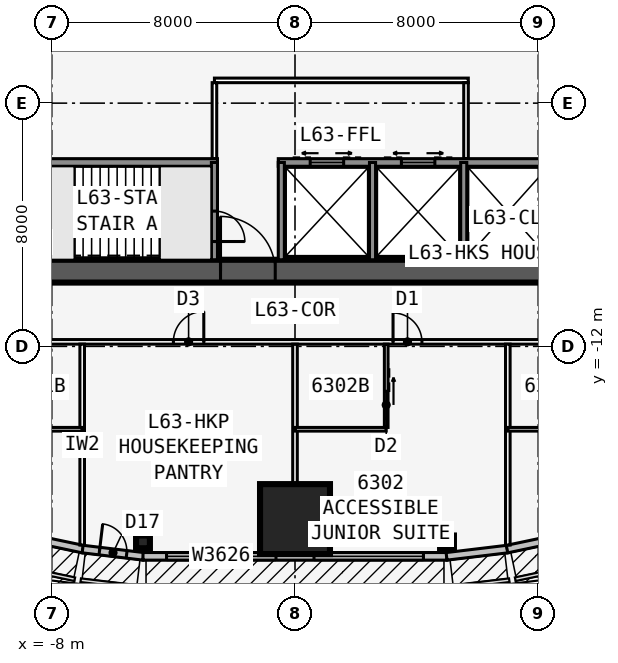
"""IFC4 building model, lengths in metres.
Left out: names, types, materials, properties, quantities, classifications, styles, units other than length and angle.
Written with IfcOpenShell. Run it as: python <this file> out.ifc"""

import sys

from ifc_helpers import new_model, si_unit, direction, frame, frame_2d, origin, origin_2d, place, context, subcontext, project, spatial, rectangle, i_section, extrude, element, fill, save


model = new_model("IFC4")
c1 = context("Model", 3, precision=1e-05, world=origin(), true_north=direction((0.0, 1.0)))
c2 = subcontext(c1, "Body", "Model", "MODEL_VIEW")
j1 = project(units=[si_unit("LENGTHUNIT", "METRE"), si_unit("PLANEANGLEUNIT", "RADIAN")], contexts=[c1])
p1 = place(None, origin())
s1 = spatial("IfcSite", under=j1, at=p1, CompositionType="ELEMENT")
p2 = place(p1, origin())
s2 = spatial("IfcBuilding", under=s1, at=p2, CompositionType="ELEMENT")
p3 = place(p2, frame((0.0, 0.0, 239.3)))
s3 = spatial("IfcBuildingStorey", under=s2, at=p3, CompositionType="ELEMENT", Elevation=239.3)
p4 = place(p3, frame((-16.5, -9.526, 0.0), z_axis=(0.0, 0.0, 1.0), x_axis=(1.0, 0.0, 0.0)))
e1 = element("IfcWall", 1, at=p4, inside=s3, PredefinedType="SHEAR", context=c2, shape_type="SweptSolid", body=[
    extrude(rectangle(XDim=33.0, YDim=0.75, at=frame_2d((16.5, 0.0))), origin(), (0.0, 0.0, 1.0), 3.6),
])
p5 = place(p4, frame((14.05, 0.0, 0.0)))
e2 = element("IfcOpeningElement", 2, at=p5, cuts=e1, PredefinedType="OPENING", context=c2, shape_type="SweptSolid", body=[
    extrude(rectangle(XDim=1.8, YDim=2.13, at=frame_2d((0.9, 1.065))), frame((0.0, 0.385, 0.0), z_axis=(0.0, -1.0, 0.0), x_axis=(1.0, 0.0, 0.0)), (0.0, 0.0, 1.0), 0.77),
])
p6 = place(p3, frame((-10.183, -5.951, 0.0), z_axis=(0.0, 0.0, 1.0), x_axis=(1.0, 0.0, 0.0)))
e3 = element("IfcWall", 3, at=p6, inside=s3, PredefinedType="SOLIDWALL", context=c2, shape_type="SweptSolid", body=[
    extrude(rectangle(XDim=7.633, YDim=0.25, at=frame_2d((3.816, 0.0))), origin(), (0.0, 0.0, 1.0), 3.435),
])
p7 = place(p3, frame((-0.55, -5.951, 0.0), z_axis=(0.0, 0.0, 1.0), x_axis=(1.0, 0.0, 0.0)))
e4 = element("IfcWall", 4, at=p7, inside=s3, PredefinedType="SOLIDWALL", context=c2, shape_type="SweptSolid", body=[
    extrude(rectangle(XDim=10.733, YDim=0.25, at=frame_2d((5.366, 0.0))), origin(), (0.0, 0.0, 1.0), 3.435),
])
p8 = place(p7, frame((9.314, 0.0, 0.0)))
e5 = element("IfcOpeningElement", 5, at=p8, cuts=e4, PredefinedType="OPENING", context=c2, shape_type="SweptSolid", body=[
    extrude(rectangle(XDim=0.9, YDim=2.13, at=frame_2d((0.45, 1.065))), frame((0.0, 0.135, 0.0), z_axis=(0.0, -1.0, 0.0), x_axis=(1.0, 0.0, 0.0)), (0.0, 0.0, 1.0), 0.27),
])
p9 = place(p7, frame((1.05, 0.0, 0.0)))
e6 = element("IfcOpeningElement", 6, at=p9, cuts=e4, PredefinedType="OPENING", context=c2, shape_type="SweptSolid", body=[
    extrude(rectangle(XDim=1.1, YDim=2.13, at=frame_2d((0.55, 1.065))), frame((0.0, 0.135, 0.0), z_axis=(0.0, -1.0, 0.0), x_axis=(1.0, 0.0, 0.0)), (0.0, 0.0, 1.0), 0.27),
])
p10 = place(p7, frame((4.05, 0.0, 0.0)))
e7 = element("IfcOpeningElement", 7, at=p10, cuts=e4, PredefinedType="OPENING", context=c2, shape_type="SweptSolid", body=[
    extrude(rectangle(XDim=1.1, YDim=2.13, at=frame_2d((0.55, 1.065))), frame((0.0, 0.135, 0.0), z_axis=(0.0, -1.0, 0.0), x_axis=(1.0, 0.0, 0.0)), (0.0, 0.0, 1.0), 0.27),
])
p11 = place(p3, frame((-2.65, -5.951, 0.0), z_axis=(0.0, 0.0, 1.0), x_axis=(0.0, -1.0, 0.0)))
e8 = element("IfcWall", 8, at=p11, inside=s3, PredefinedType="SOLIDWALL", context=c2, shape_type="SweptSolid", body=[
    extrude(rectangle(XDim=3.2, YDim=0.2, at=frame_2d((1.6, 0.0))), origin(), (0.0, 0.0, 1.0), 3.435),
])
p12 = place(p11, frame((1.6, 0.0, 0.0)))
e9 = element("IfcOpeningElement", 9, at=p12, cuts=e8, PredefinedType="OPENING", context=c2, shape_type="SweptSolid", body=[
    extrude(rectangle(XDim=1.0, YDim=2.13, at=frame_2d((0.5, 1.065))), frame((0.0, 0.11, 0.0), z_axis=(0.0, -1.0, 0.0), x_axis=(1.0, 0.0, 0.0)), (0.0, 0.0, 1.0), 0.22),
])
for number, where, z_axis, x_axis in (
    (10, (-0.45, -5.951, 0.0), (0.0, 0.0, 1.0), (0.0, -1.0, 0.0)),
    (11, (2.55, -5.951, 0.0), (0.0, 0.0, 1.0), (0.0, -1.0, 0.0)),
    (12, (5.55, -5.951, 0.0), (0.0, 0.0, 1.0), (0.0, -1.0, 0.0)),
):
    element("IfcWall", number, at=place(p3, frame(where, z_axis=z_axis, x_axis=x_axis)), inside=s3, PredefinedType="SOLIDWALL", context=c2, shape_type="SweptSolid", body=[
        extrude(rectangle(XDim=3.2, YDim=0.2, at=frame_2d((1.6, 0.0))), origin(), (0.0, 0.0, 1.0), 3.435),
    ])
p13 = place(p3, frame((16.5, -9.526, 0.0), z_axis=(0.0, 0.0, 1.0), x_axis=(-0.499999749417, 0.866025548458, 0.0)))
e13 = element("IfcWall", 13, at=p13, inside=s3, PredefinedType="SHEAR", context=c2, shape_type="SweptSolid", body=[
    extrude(rectangle(XDim=33.0, YDim=0.75, at=frame_2d((16.5, 0.0))), origin(), (0.0, 0.0, 1.0), 3.6),
])
p14 = place(p13, frame((14.15, 0.0, 0.0)))
e14 = element("IfcOpeningElement", 14, at=p14, cuts=e13, PredefinedType="OPENING", context=c2, shape_type="SweptSolid", body=[
    extrude(rectangle(XDim=1.8, YDim=2.13, at=frame_2d((0.9, 1.065))), frame((0.0, 0.385, 0.0), z_axis=(0.0, -1.0, 0.0), x_axis=(1.0, 0.0, 0.0)), (0.0, 0.0, 1.0), 0.77),
])
p15 = place(p13, frame((12.6, 0.0, 0.0)))
e15 = element("IfcOpeningElement", 15, at=p15, cuts=e13, PredefinedType="OPENING", context=c2, shape_type="SweptSolid", body=[
    extrude(rectangle(XDim=1.0, YDim=2.13, at=frame_2d((0.5, 1.065))), frame((0.0, 0.385, 0.0), z_axis=(0.0, -1.0, 0.0), x_axis=(1.0, 0.0, 0.0)), (0.0, 0.0, 1.0), 0.77),
])
p16 = place(p3, frame((10.245, -5.843, 0.0), z_axis=(0.0, 0.0, 1.0), x_axis=(-0.499993009313, 0.866029439822, 0.0)))
e16 = element("IfcWall", 16, at=p16, inside=s3, PredefinedType="SOLIDWALL", context=c2, shape_type="SweptSolid", body=[
    extrude(rectangle(XDim=7.733, YDim=0.25, at=frame_2d((3.866, 0.0))), origin(), (0.0, 0.0, 1.0), 3.435),
])
p17 = place(p3, frame((0.0, 19.052, 0.0), z_axis=(0.0, 0.0, 1.0), x_axis=(-0.499999749417, -0.866025548458, 0.0)))
e17 = element("IfcWall", 17, at=p17, inside=s3, PredefinedType="SHEAR", context=c2, shape_type="SweptSolid", body=[
    extrude(rectangle(XDim=33.0, YDim=0.75, at=frame_2d((16.5, 0.0))), origin(), (0.0, 0.0, 1.0), 3.6),
])
p18 = place(p17, frame((14.15, 0.0, 0.0)))
e18 = element("IfcOpeningElement", 18, at=p18, cuts=e17, PredefinedType="OPENING", context=c2, shape_type="SweptSolid", body=[
    extrude(rectangle(XDim=1.8, YDim=2.13, at=frame_2d((0.9, 1.065))), frame((0.0, 0.385, 0.0), z_axis=(0.0, -1.0, 0.0), x_axis=(1.0, 0.0, 0.0)), (0.0, 0.0, 1.0), 0.77),
])
p19 = place(p17, frame((12.6, 0.0, 0.0)))
e19 = element("IfcOpeningElement", 19, at=p19, cuts=e17, PredefinedType="OPENING", context=c2, shape_type="SweptSolid", body=[
    extrude(rectangle(XDim=1.0, YDim=2.13, at=frame_2d((0.5, 1.065))), frame((0.0, 0.385, 0.0), z_axis=(0.0, -1.0, 0.0), x_axis=(1.0, 0.0, 0.0)), (0.0, 0.0, 1.0), 0.77),
])
p20 = place(p3, frame((-4.929, 3.365, 0.0), z_axis=(0.0, 0.0, 1.0), x_axis=(-0.499991433582, -0.866030349552, 0.0)))
e20 = element("IfcWall", 20, at=p20, inside=s3, PredefinedType="SOLIDWALL", context=c2, shape_type="SweptSolid", body=[
    extrude(rectangle(XDim=10.633, YDim=0.25, at=frame_2d((5.316, 0.0))), origin(), (0.0, 0.0, 1.0), 3.435),
])
p21 = place(p20, frame((9.164, 0.0, 0.0)))
e21 = element("IfcOpeningElement", 21, at=p21, cuts=e20, PredefinedType="OPENING", context=c2, shape_type="SweptSolid", body=[
    extrude(rectangle(XDim=0.9, YDim=2.13, at=frame_2d((0.45, 1.065))), frame((0.0, 0.135, 0.0), z_axis=(0.0, -1.0, 0.0), x_axis=(1.0, 0.0, 0.0)), (0.0, 0.0, 1.0), 0.27),
])
p22 = place(p20, frame((1.1, 0.0, 0.0)))
e22 = element("IfcOpeningElement", 22, at=p22, cuts=e20, PredefinedType="OPENING", context=c2, shape_type="SweptSolid", body=[
    extrude(rectangle(XDim=0.9, YDim=2.13, at=frame_2d((0.45, 1.065))), frame((0.0, 0.135, 0.0), z_axis=(0.0, -1.0, 0.0), x_axis=(1.0, 0.0, 0.0)), (0.0, 0.0, 1.0), 0.27),
])
p23 = place(p20, frame((4.0, 0.0, 0.0)))
e23 = element("IfcOpeningElement", 23, at=p23, cuts=e20, PredefinedType="OPENING", context=c2, shape_type="SweptSolid", body=[
    extrude(rectangle(XDim=0.9, YDim=2.13, at=frame_2d((0.45, 1.065))), frame((0.0, 0.135, 0.0), z_axis=(0.0, -1.0, 0.0), x_axis=(1.0, 0.0, 0.0)), (0.0, 0.0, 1.0), 0.27),
])
for number, where, z_axis, x_axis in (
    (24, (-5.0, -18.43, 0.0), (0.0, 0.0, 1.0), (0.0, -1.0, 0.0)),
    (25, (5.0, -18.43, 0.0), (0.0, 0.0, 1.0), (0.0, -1.0, 0.0)),
):
    element("IfcColumn", number, at=place(p3, frame(where, z_axis=z_axis, x_axis=x_axis)), inside=s3, PredefinedType="COLUMN", context=c2, shape_type="SweptSolid", body=[
        extrude(i_section(OverallWidth=0.419, OverallDepth=0.455, WebThickness=0.042, FlangeThickness=0.068, at=origin_2d()), origin(), (0.0, 0.0, 1.0), 3.6),
    ])
p24 = place(p3, frame((0.0, -17.68, 0.0), z_axis=(0.0, 0.0, 1.0), x_axis=(0.0, -1.0, 0.0)))
e26 = element("IfcColumn", 26, at=p24, inside=s3, PredefinedType="COLUMN", context=c2, shape_type="SweptSolid", body=[
    extrude(rectangle(XDim=2.3, YDim=2.3, at=origin_2d()), origin(), (0.0, 0.0, 1.0), 3.6),
])
p25 = place(p3, frame((-13.974, -17.198, 0.0), z_axis=(0.0, 0.0, 1.0), x_axis=(0.978654320409, -0.205513311355, 0.0)))
e27 = element("IfcWall", 27, at=p25, inside=s3, PredefinedType="STANDARD", context=c2, shape_type="SweptSolid", body=[
    extrude(rectangle(XDim=7.153, YDim=0.25, at=frame_2d((3.576, 0.0))), origin(), (0.0, 0.0, 1.0), 3.435),
])
p26 = place(p25, frame((1.476, 0.0, 0.45)))
e28 = element("IfcOpeningElement", 28, at=p26, cuts=e27, PredefinedType="OPENING", context=c2, shape_type="SweptSolid", body=[
    extrude(rectangle(XDim=4.2, YDim=2.6, at=frame_2d((2.1, 1.3))), frame((0.0, 0.135, 0.0), z_axis=(0.0, -1.0, 0.0), x_axis=(1.0, 0.0, 0.0)), (0.0, 0.0, 1.0), 0.27),
])
p27 = place(p3, frame((-6.985, -18.667, 0.0), z_axis=(0.0, 0.0, 1.0), x_axis=(0.992877411981, -0.119140441403, 0.0)))
e29 = element("IfcWall", 29, at=p27, inside=s3, PredefinedType="STANDARD", context=c2, shape_type="SweptSolid", body=[
    extrude(rectangle(XDim=2.014, YDim=0.25, at=frame_2d((1.007, 0.0))), origin(), (0.0, 0.0, 1.0), 3.435),
])
p28 = place(p27, frame((0.557, 0.0, 0.0)))
e30 = element("IfcOpeningElement", 30, at=p28, cuts=e29, PredefinedType="OPENING", context=c2, shape_type="SweptSolid", body=[
    extrude(rectangle(XDim=0.9, YDim=2.13, at=frame_2d((0.45, 1.065))), frame((0.0, 0.135, 0.0), z_axis=(0.0, -1.0, 0.0), x_axis=(1.0, 0.0, 0.0)), (0.0, 0.0, 1.0), 0.27),
])
p29 = place(p3, frame((-5.0, -18.906, 0.0), z_axis=(0.0, 0.0, 1.0), x_axis=(1.0, 0.0, 0.0)))
e31 = element("IfcWall", 31, at=p29, inside=s3, PredefinedType="STANDARD", context=c2, shape_type="SweptSolid", body=[
    extrude(rectangle(XDim=10.0, YDim=0.25, at=frame_2d((5.0, 0.0))), origin(), (0.0, 0.0, 1.0), 3.435),
])
p30 = place(p29, frame((0.775, 0.0, 0.45)))
e32 = element("IfcOpeningElement", 32, at=p30, cuts=e31, PredefinedType="OPENING", context=c2, shape_type="SweptSolid", body=[
    extrude(rectangle(XDim=3.6, YDim=2.6, at=frame_2d((1.8, 1.3))), frame((0.0, 0.135, 0.0), z_axis=(0.0, -1.0, 0.0), x_axis=(1.0, 0.0, 0.0)), (0.0, 0.0, 1.0), 0.27),
])
p31 = place(p29, frame((5.625, 0.0, 0.45)))
e33 = element("IfcOpeningElement", 33, at=p31, cuts=e31, PredefinedType="OPENING", context=c2, shape_type="SweptSolid", body=[
    extrude(rectangle(XDim=3.6, YDim=2.6, at=frame_2d((1.8, 1.3))), frame((0.0, 0.135, 0.0), z_axis=(0.0, -1.0, 0.0), x_axis=(1.0, 0.0, 0.0)), (0.0, 0.0, 1.0), 0.27),
])
p32 = place(p3, frame((4.985, -18.906, 0.0), z_axis=(0.0, 0.0, 1.0), x_axis=(0.992877411981, 0.119140441403, 0.0)))
e34 = element("IfcWall", 34, at=p32, inside=s3, PredefinedType="STANDARD", context=c2, shape_type="SweptSolid", body=[
    extrude(rectangle(XDim=2.014, YDim=0.25, at=frame_2d((1.007, 0.0))), origin(), (0.0, 0.0, 1.0), 3.435),
])
p33 = place(p3, frame((6.974, -18.668, 0.0), z_axis=(0.0, 0.0, 1.0), x_axis=(0.978654320409, 0.205513311355, 0.0)))
e35 = element("IfcWall", 35, at=p33, inside=s3, PredefinedType="STANDARD", context=c2, shape_type="SweptSolid", body=[
    extrude(rectangle(XDim=7.153, YDim=0.25, at=frame_2d((3.576, 0.0))), origin(), (0.0, 0.0, 1.0), 3.435),
])
p34 = place(p33, frame((1.476, 0.0, 0.45)))
e36 = element("IfcOpeningElement", 36, at=p34, cuts=e35, PredefinedType="OPENING", context=c2, shape_type="SweptSolid", body=[
    extrude(rectangle(XDim=4.2, YDim=2.6, at=frame_2d((2.1, 1.3))), frame((0.0, 0.135, 0.0), z_axis=(0.0, -1.0, 0.0), x_axis=(1.0, 0.0, 0.0)), (0.0, 0.0, 1.0), 0.27),
])
p35 = place(p3, frame((-19.677, -11.851, 0.0), z_axis=(0.0, 0.0, 1.0), x_axis=(1.0, 0.0, 0.0)))
e37 = element("IfcWall", 37, at=p35, inside=s3, PredefinedType="PARTITIONING", context=c2, shape_type="SweptSolid", body=[
    extrude(rectangle(XDim=39.354, YDim=0.15, at=frame_2d((19.677, 0.0))), origin(), (0.0, 0.0, 1.0), 3.435),
])
p36 = place(p35, frame((8.502, 0.0, 0.0)))
e38 = element("IfcOpeningElement", 38, at=p36, cuts=e37, PredefinedType="OPENING", context=c2, shape_type="SweptSolid", body=[
    extrude(rectangle(XDim=0.95, YDim=2.13, at=frame_2d((0.475, 1.065))), frame((0.0, 0.085, 0.0), z_axis=(0.0, -1.0, 0.0), x_axis=(1.0, 0.0, 0.0)), (0.0, 0.0, 1.0), 0.17),
])
p37 = place(p35, frame((15.677, 0.0, 0.0)))
e39 = element("IfcOpeningElement", 39, at=p37, cuts=e37, PredefinedType="OPENING", context=c2, shape_type="SweptSolid", body=[
    extrude(rectangle(XDim=1.0, YDim=2.13, at=frame_2d((0.5, 1.065))), frame((0.0, 0.085, 0.0), z_axis=(0.0, -1.0, 0.0), x_axis=(1.0, 0.0, 0.0)), (0.0, 0.0, 1.0), 0.17),
])
p38 = place(p35, frame((22.902, 0.0, 0.0)))
e40 = element("IfcOpeningElement", 40, at=p38, cuts=e37, PredefinedType="OPENING", context=c2, shape_type="SweptSolid", body=[
    extrude(rectangle(XDim=0.95, YDim=2.13, at=frame_2d((0.475, 1.065))), frame((0.0, 0.085, 0.0), z_axis=(0.0, -1.0, 0.0), x_axis=(1.0, 0.0, 0.0)), (0.0, 0.0, 1.0), 0.17),
])
p39 = place(p35, frame((29.902, 0.0, 0.0)))
e41 = element("IfcOpeningElement", 41, at=p39, cuts=e37, PredefinedType="OPENING", context=c2, shape_type="SweptSolid", body=[
    extrude(rectangle(XDim=0.95, YDim=2.13, at=frame_2d((0.475, 1.065))), frame((0.0, 0.085, 0.0), z_axis=(0.0, -1.0, 0.0), x_axis=(1.0, 0.0, 0.0)), (0.0, 0.0, 1.0), 0.17),
])
p40 = place(p3, frame((-7.0, -11.926, 0.0), z_axis=(0.0, 0.0, 1.0), x_axis=(0.0, -1.0, 0.0)))
e42 = element("IfcWall", 42, at=p40, inside=s3, PredefinedType="PARTITIONING", context=c2, shape_type="SweptSolid", body=[
    extrude(rectangle(XDim=6.609, YDim=0.15, at=frame_2d((3.304, 0.0))), origin(), (0.0, 0.0, 1.0), 2.678),
])
p41 = place(p3, frame((0.0, -11.926, 0.0), z_axis=(0.0, 0.0, 1.0), x_axis=(0.0, -1.0, 0.0)))
e43 = element("IfcWall", 43, at=p41, inside=s3, PredefinedType="PARTITIONING", context=c2, shape_type="SweptSolid", body=[
    extrude(rectangle(XDim=6.854, YDim=0.15, at=frame_2d((3.427, 0.0))), origin(), (0.0, 0.0, 1.0), 2.678),
])
p42 = place(p3, frame((7.0, -11.926, 0.0), z_axis=(0.0, 0.0, 1.0), x_axis=(0.0, -1.0, 0.0)))
e44 = element("IfcWall", 44, at=p42, inside=s3, PredefinedType="PARTITIONING", context=c2, shape_type="SweptSolid", body=[
    extrude(rectangle(XDim=6.609, YDim=0.15, at=frame_2d((3.304, 0.0))), origin(), (0.0, 0.0, 1.0), 2.678),
])
for number, where, z_axis, x_axis in (
    (45, (-10.0, -14.726, 0.0), (0.0, 0.0, 1.0), (1.0, 0.0, 0.0)),
    (46, (0.0, -14.726, 0.0), (0.0, 0.0, 1.0), (1.0, 0.0, 0.0)),
):
    element("IfcWall", number, at=place(p3, frame(where, z_axis=z_axis, x_axis=x_axis)), inside=s3, PredefinedType="PLUMBINGWALL", context=c2, shape_type="SweptSolid", body=[
        extrude(rectangle(XDim=3.0, YDim=0.12, at=frame_2d((1.5, 0.0))), origin(), (0.0, 0.0, 1.0), 3.435),
    ])
p43 = place(p3, frame((3.0, -11.926, 0.0), z_axis=(0.0, 0.0, 1.0), x_axis=(0.0, -1.0, 0.0)))
e47 = element("IfcWall", 47, at=p43, inside=s3, PredefinedType="PLUMBINGWALL", context=c2, shape_type="SweptSolid", body=[
    extrude(rectangle(XDim=2.74, YDim=0.12, at=frame_2d((1.37, 0.0))), origin(), (0.0, 0.0, 1.0), 3.435),
])
p44 = place(p43, frame((1.55, 0.0, 0.0)))
e48 = element("IfcOpeningElement", 48, at=p44, cuts=e47, PredefinedType="OPENING", context=c2, shape_type="SweptSolid", body=[
    extrude(rectangle(XDim=0.9, YDim=2.13, at=frame_2d((0.45, 1.065))), frame((0.0, 0.07, 0.0), z_axis=(0.0, -1.0, 0.0), x_axis=(1.0, 0.0, 0.0)), (0.0, 0.0, 1.0), 0.14),
])
p45 = place(p3, frame((7.0, -14.726, 0.0), z_axis=(0.0, 0.0, 1.0), x_axis=(1.0, 0.0, 0.0)))
e49 = element("IfcWall", 49, at=p45, inside=s3, PredefinedType="PLUMBINGWALL", context=c2, shape_type="SweptSolid", body=[
    extrude(rectangle(XDim=3.0, YDim=0.12, at=frame_2d((1.5, 0.0))), origin(), (0.0, 0.0, 1.0), 3.435),
])
p46 = place(p3, frame((-0.425, 22.966, 0.0), z_axis=(0.0, 0.0, 1.0), x_axis=(-0.500000265775, -0.866025250339, 0.0)))
e50 = element("IfcWall", 50, at=p46, inside=s3, PredefinedType="PARTITIONING", context=c2, shape_type="SweptSolid", body=[
    extrude(rectangle(XDim=39.354, YDim=0.15, at=frame_2d((19.677, 0.0))), origin(), (0.0, 0.0, 1.0), 3.435),
])
p47 = place(p46, frame((8.502, 0.0, 0.0)))
e51 = element("IfcOpeningElement", 51, at=p47, cuts=e50, PredefinedType="OPENING", context=c2, shape_type="SweptSolid", body=[
    extrude(rectangle(XDim=0.95, YDim=2.13, at=frame_2d((0.475, 1.065))), frame((0.0, 0.085, 0.0), z_axis=(0.0, -1.0, 0.0), x_axis=(1.0, 0.0, 0.0)), (0.0, 0.0, 1.0), 0.17),
])
p48 = place(p46, frame((15.902, 0.0, 0.0)))
e52 = element("IfcOpeningElement", 52, at=p48, cuts=e50, PredefinedType="OPENING", context=c2, shape_type="SweptSolid", body=[
    extrude(rectangle(XDim=0.95, YDim=2.13, at=frame_2d((0.475, 1.065))), frame((0.0, 0.085, 0.0), z_axis=(0.0, -1.0, 0.0), x_axis=(1.0, 0.0, 0.0)), (0.0, 0.0, 1.0), 0.17),
])
p49 = place(p46, frame((22.902, 0.0, 0.0)))
e53 = element("IfcOpeningElement", 53, at=p49, cuts=e50, PredefinedType="OPENING", context=c2, shape_type="SweptSolid", body=[
    extrude(rectangle(XDim=0.95, YDim=2.13, at=frame_2d((0.475, 1.065))), frame((0.0, 0.085, 0.0), z_axis=(0.0, -1.0, 0.0), x_axis=(1.0, 0.0, 0.0)), (0.0, 0.0, 1.0), 0.17),
])
p50 = place(p46, frame((29.902, 0.0, 0.0)))
e54 = element("IfcOpeningElement", 54, at=p50, cuts=e50, PredefinedType="OPENING", context=c2, shape_type="SweptSolid", body=[
    extrude(rectangle(XDim=0.95, YDim=2.13, at=frame_2d((0.475, 1.065))), frame((0.0, 0.085, 0.0), z_axis=(0.0, -1.0, 0.0), x_axis=(1.0, 0.0, 0.0)), (0.0, 0.0, 1.0), 0.17),
])
p51 = place(p3, frame((-2.65, -3.251, 0.0), z_axis=(0.0, 0.0, 1.0), x_axis=(1.0, 0.0, 0.0)))
e55 = element("IfcWall", 55, at=p51, inside=s3, PredefinedType="PARTITIONING", context=c2, shape_type="SweptSolid", body=[
    extrude(rectangle(XDim=8.35, YDim=0.15, at=frame_2d((4.175, 0.0))), origin(), (0.0, 0.0, 1.0), 3.435),
])
for number, where, z_axis, x_axis in (
    (56, (-2.65, -5.826, 0.0), (0.0, 0.0, 1.0), (0.0, 1.0, 0.0)),
    (57, (5.625, -5.826, 0.0), (0.0, 0.0, 1.0), (0.0, 1.0, 0.0)),
):
    element("IfcWall", number, at=place(p3, frame(where, z_axis=z_axis, x_axis=x_axis)), inside=s3, PredefinedType="PARTITIONING", context=c2, shape_type="SweptSolid", body=[
        extrude(rectangle(XDim=2.5, YDim=0.15, at=frame_2d((1.25, 0.0))), origin(), (0.0, 0.0, 1.0), 3.435),
    ])
p52 = place(p3, frame((-7.247, -7.576, 0.0), z_axis=(0.0, 0.0, 1.0), x_axis=(1.0, 0.0, 0.0)))
e58 = element("IfcWall", 58, at=p52, inside=s3, PredefinedType="SOLIDWALL", context=c2, shape_type="SweptSolid", body=[
    extrude(rectangle(XDim=2.794, YDim=0.1, at=frame_2d((1.397, 0.0))), origin(), (0.0, 0.0, 1.0), 3.6),
])
p53 = place(p28, origin())
e59 = element("IfcDoor", 59, at=p53, inside=s3, OperationType="SINGLE_SWING_LEFT", PredefinedType="DOOR", context=c2, shape_type="SweptSolid", body=[
    extrude(rectangle(XDim=0.9, YDim=2.13, at=frame_2d((0.45, 1.065))), frame((0.0, 0.025, 0.0), z_axis=(0.0, -1.0, 0.0), x_axis=(1.0, 0.0, 0.0)), (0.0, 0.0, 1.0), 0.05),
])
fill(e30, e59)
p54 = place(p30, origin())
e60 = element("IfcWindow", 60, at=p54, inside=s3, PartitioningType="SINGLE_PANEL", PredefinedType="WINDOW", context=c2, shape_type="SweptSolid", body=[
    extrude(rectangle(XDim=3.6, YDim=2.6, at=frame_2d((1.8, 1.3))), frame((0.0, 0.03, 0.0), z_axis=(0.0, -1.0, 0.0), x_axis=(1.0, 0.0, 0.0)), (0.0, 0.0, 1.0), 0.06),
])
fill(e32, e60)
p55 = place(p31, origin())
e61 = element("IfcWindow", 61, at=p55, inside=s3, PartitioningType="SINGLE_PANEL", PredefinedType="WINDOW", context=c2, shape_type="SweptSolid", body=[
    extrude(rectangle(XDim=3.6, YDim=2.6, at=frame_2d((1.8, 1.3))), frame((0.0, 0.03, 0.0), z_axis=(0.0, -1.0, 0.0), x_axis=(1.0, 0.0, 0.0)), (0.0, 0.0, 1.0), 0.06),
])
fill(e33, e61)
p56 = place(p37, origin())
e62 = element("IfcDoor", 62, at=p56, inside=s3, OperationType="SINGLE_SWING_RIGHT", PredefinedType="DOOR", context=c2, shape_type="SweptSolid", body=[
    extrude(rectangle(XDim=1.0, YDim=2.13, at=frame_2d((0.5, 1.065))), frame((0.0, 0.025, 0.0), z_axis=(0.0, -1.0, 0.0), x_axis=(1.0, 0.0, 0.0)), (0.0, 0.0, 1.0), 0.05),
])
fill(e39, e62)
p57 = place(p44, origin())
e63 = element("IfcDoor", 63, at=p57, inside=s3, OperationType="SLIDING_TO_LEFT", PredefinedType="DOOR", context=c2, shape_type="SweptSolid", body=[
    extrude(rectangle(XDim=0.9, YDim=2.13, at=frame_2d((0.45, 1.065))), frame((0.0, 0.025, 0.0), z_axis=(0.0, -1.0, 0.0), x_axis=(1.0, 0.0, 0.0)), (0.0, 0.0, 1.0), 0.05),
])
fill(e48, e63)
p58 = place(p38, origin())
e64 = element("IfcDoor", 64, at=p58, inside=s3, OperationType="SINGLE_SWING_LEFT", PredefinedType="DOOR", context=c2, shape_type="SweptSolid", body=[
    extrude(rectangle(XDim=0.95, YDim=2.13, at=frame_2d((0.475, 1.065))), frame((0.0, 0.025, 0.0), z_axis=(0.0, -1.0, 0.0), x_axis=(1.0, 0.0, 0.0)), (0.0, 0.0, 1.0), 0.05),
])
fill(e40, e64)
p59 = place(p5, origin())
e65 = element("IfcDoor", 65, at=p59, inside=s3, OperationType="DOUBLE_DOOR_SINGLE_SWING", PredefinedType="DOOR", context=c2, shape_type="SweptSolid", body=[
    extrude(rectangle(XDim=1.8, YDim=2.13, at=frame_2d((0.9, 1.065))), frame((0.0, 0.025, 0.0), z_axis=(0.0, -1.0, 0.0), x_axis=(1.0, 0.0, 0.0)), (0.0, 0.0, 1.0), 0.05),
])
fill(e2, e65)
p60 = place(p12, origin())
e66 = element("IfcDoor", 66, at=p60, inside=s3, OperationType="SINGLE_SWING_RIGHT", PredefinedType="DOOR", context=c2, shape_type="SweptSolid", body=[
    extrude(rectangle(XDim=1.0, YDim=2.13, at=frame_2d((0.5, 1.065))), frame((0.0, 0.025, 0.0), z_axis=(0.0, -1.0, 0.0), x_axis=(1.0, 0.0, 0.0)), (0.0, 0.0, 1.0), 0.05),
])
fill(e9, e66)
p61 = place(p9, origin())
e67 = element("IfcDoor", 67, at=p61, inside=s3, OperationType="DOUBLE_DOOR_SLIDING", PredefinedType="USERDEFINED", context=c2, shape_type="SweptSolid", body=[
    extrude(rectangle(XDim=1.1, YDim=2.13, at=frame_2d((0.55, 1.065))), frame((0.0, 0.025, 0.0), z_axis=(0.0, -1.0, 0.0), x_axis=(1.0, 0.0, 0.0)), (0.0, 0.0, 1.0), 0.05),
])
fill(e6, e67)
p62 = place(p10, origin())
e68 = element("IfcDoor", 68, at=p62, inside=s3, OperationType="DOUBLE_DOOR_SLIDING", PredefinedType="USERDEFINED", context=c2, shape_type="SweptSolid", body=[
    extrude(rectangle(XDim=1.1, YDim=2.13, at=frame_2d((0.55, 1.065))), frame((0.0, 0.025, 0.0), z_axis=(0.0, -1.0, 0.0), x_axis=(1.0, 0.0, 0.0)), (0.0, 0.0, 1.0), 0.05),
])
fill(e7, e68)
save(model, sys.argv[1])
